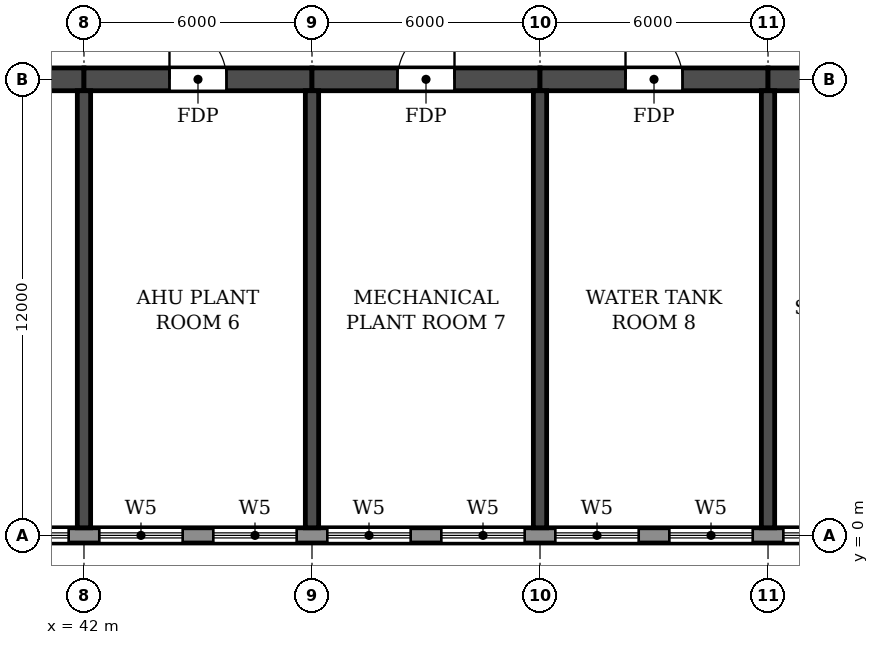
"""IFC4 building model, lengths in metres.
Left out: names, types, materials, properties, quantities, classifications, styles, units other than length and angle.
Written with IfcOpenShell. Run it as: python <this file> out.ifc"""

import sys

from ifc_helpers import new_model, si_unit, direction, frame, frame_2d, origin, place, context, subcontext, project, spatial, rectangle, extrude, element, fill, save


model = new_model("IFC4")
c1 = context("Model", 3, precision=1e-05, world=origin(), true_north=direction((0.0, 1.0)))
c2 = subcontext(c1, "Body", "Model", "MODEL_VIEW")
j1 = project(units=[si_unit("LENGTHUNIT", "METRE"), si_unit("PLANEANGLEUNIT", "RADIAN")], contexts=[c1])
p1 = place(None, origin())
s1 = spatial("IfcSite", under=j1, at=p1, CompositionType="ELEMENT")
p2 = place(p1, origin())
s2 = spatial("IfcBuilding", under=s1, at=p2, CompositionType="ELEMENT")
p3 = place(p2, frame((0.0, 0.0, 115.8)))
s3 = spatial("IfcBuildingStorey", under=s2, at=p3, CompositionType="ELEMENT", Elevation=115.8)
for number, where, z_axis, x_axis in (
    (1, (42.0, 0.2, 0.0), (0.0, 0.0, 1.0), (0.0, 1.0, 0.0)),
    (2, (48.0, 0.2, 0.0), (0.0, 0.0, 1.0), (0.0, 1.0, 0.0)),
    (3, (54.0, 0.2, 0.0), (0.0, 0.0, 1.0), (0.0, 1.0, 0.0)),
    (4, (60.0, 0.2, 0.0), (0.0, 0.0, 1.0), (0.0, 1.0, 0.0)),
):
    element("IfcWall", number, at=place(p3, frame(where, z_axis=z_axis, x_axis=x_axis)), inside=s3, PredefinedType="SHEAR", context=c2, shape_type="SweptSolid", body=[
        extrude(rectangle(XDim=11.5, YDim=0.35, at=frame_2d((5.75, 0.0))), origin(), (0.0, 0.0, 1.0), 6.37),
    ])
p4 = place(p3, frame((36.0, 12.0, 0.0), z_axis=(0.0, 0.0, 1.0), x_axis=(1.0, 0.0, 0.0)))
e5 = element("IfcWall", 5, at=p4, inside=s3, PredefinedType="SHEAR", context=c2, shape_type="SweptSolid", body=[
    extrude(rectangle(XDim=6.0, YDim=0.6, at=frame_2d((3.0, 0.0))), origin(), (0.0, 0.0, 1.0), 6.37),
])
p5 = place(p4, frame((2.25, 0.0, 0.0)))
e6 = element("IfcOpeningElement", 6, at=p5, cuts=e5, PredefinedType="OPENING", context=c2, shape_type="SweptSolid", body=[
    extrude(rectangle(XDim=1.5, YDim=2.1, at=frame_2d((0.75, 1.05))), frame((0.0, 0.31, 0.0), z_axis=(0.0, -1.0, 0.0), x_axis=(1.0, 0.0, 0.0)), (0.0, 0.0, 1.0), 0.62),
])
p6 = place(p3, frame((42.0, 12.0, 0.0), z_axis=(0.0, 0.0, 1.0), x_axis=(1.0, 0.0, 0.0)))
e7 = element("IfcWall", 7, at=p6, inside=s3, PredefinedType="SHEAR", context=c2, shape_type="SweptSolid", body=[
    extrude(rectangle(XDim=6.0, YDim=0.6, at=frame_2d((3.0, 0.0))), origin(), (0.0, 0.0, 1.0), 6.37),
])
p7 = place(p6, frame((2.25, 0.0, 0.0)))
e8 = element("IfcOpeningElement", 8, at=p7, cuts=e7, PredefinedType="OPENING", context=c2, shape_type="SweptSolid", body=[
    extrude(rectangle(XDim=1.5, YDim=2.1, at=frame_2d((0.75, 1.05))), frame((0.0, 0.31, 0.0), z_axis=(0.0, -1.0, 0.0), x_axis=(1.0, 0.0, 0.0)), (0.0, 0.0, 1.0), 0.62),
])
p8 = place(p3, frame((48.0, 12.0, 0.0), z_axis=(0.0, 0.0, 1.0), x_axis=(1.0, 0.0, 0.0)))
e9 = element("IfcWall", 9, at=p8, inside=s3, PredefinedType="SHEAR", context=c2, shape_type="SweptSolid", body=[
    extrude(rectangle(XDim=6.0, YDim=0.6, at=frame_2d((3.0, 0.0))), origin(), (0.0, 0.0, 1.0), 6.37),
])
p9 = place(p8, frame((2.25, 0.0, 0.0)))
e10 = element("IfcOpeningElement", 10, at=p9, cuts=e9, PredefinedType="OPENING", context=c2, shape_type="SweptSolid", body=[
    extrude(rectangle(XDim=1.5, YDim=2.1, at=frame_2d((0.75, 1.05))), frame((0.0, 0.31, 0.0), z_axis=(0.0, -1.0, 0.0), x_axis=(1.0, 0.0, 0.0)), (0.0, 0.0, 1.0), 0.62),
])
p10 = place(p3, frame((54.0, 12.0, 0.0), z_axis=(0.0, 0.0, 1.0), x_axis=(1.0, 0.0, 0.0)))
e11 = element("IfcWall", 11, at=p10, inside=s3, PredefinedType="SHEAR", context=c2, shape_type="SweptSolid", body=[
    extrude(rectangle(XDim=6.0, YDim=0.6, at=frame_2d((3.0, 0.0))), origin(), (0.0, 0.0, 1.0), 6.37),
])
p11 = place(p10, frame((2.25, 0.0, 0.0)))
e12 = element("IfcOpeningElement", 12, at=p11, cuts=e11, PredefinedType="OPENING", context=c2, shape_type="SweptSolid", body=[
    extrude(rectangle(XDim=1.5, YDim=2.1, at=frame_2d((0.75, 1.05))), frame((0.0, 0.31, 0.0), z_axis=(0.0, -1.0, 0.0), x_axis=(1.0, 0.0, 0.0)), (0.0, 0.0, 1.0), 0.62),
])
p12 = place(p3, frame((60.0, 12.0, 0.0), z_axis=(0.0, 0.0, 1.0), x_axis=(1.0, 0.0, 0.0)))
e13 = element("IfcWall", 13, at=p12, inside=s3, PredefinedType="SHEAR", context=c2, shape_type="SweptSolid", body=[
    extrude(rectangle(XDim=6.0, YDim=0.6, at=frame_2d((3.0, 0.0))), origin(), (0.0, 0.0, 1.0), 6.37),
])
p13 = place(p12, frame((2.25, 0.0, 0.0)))
e14 = element("IfcOpeningElement", 14, at=p13, cuts=e13, PredefinedType="OPENING", context=c2, shape_type="SweptSolid", body=[
    extrude(rectangle(XDim=1.5, YDim=2.1, at=frame_2d((0.75, 1.05))), frame((0.0, 0.31, 0.0), z_axis=(0.0, -1.0, 0.0), x_axis=(1.0, 0.0, 0.0)), (0.0, 0.0, 1.0), 0.62),
])
p14 = place(p3, frame((16.683, 0.0, 0.0), z_axis=(0.0, 0.0, 1.0), x_axis=(1.0, 0.0, 0.0)))
e15 = element("IfcWall", 15, at=p14, inside=s3, PredefinedType="STANDARD", context=c2, shape_type="SweptSolid", body=[
    extrude(rectangle(XDim=68.634, YDim=0.4, at=frame_2d((34.317, 0.0))), origin(), (0.0, 0.0, 1.0), 6.37),
])
p15 = place(p14, frame((1.717, 0.0, 0.6)))
e16 = element("IfcOpeningElement", 16, at=p15, cuts=e15, PredefinedType="OPENING", context=c2, shape_type="SweptSolid", body=[
    extrude(rectangle(XDim=2.2, YDim=2.4, at=frame_2d((1.1, 1.2))), frame((0.0, 0.21, 0.0), z_axis=(0.0, -1.0, 0.0), x_axis=(1.0, 0.0, 0.0)), (0.0, 0.0, 1.0), 0.42),
])
p16 = place(p14, frame((4.717, 0.0, 0.6)))
e17 = element("IfcOpeningElement", 17, at=p16, cuts=e15, PredefinedType="OPENING", context=c2, shape_type="SweptSolid", body=[
    extrude(rectangle(XDim=2.2, YDim=2.4, at=frame_2d((1.1, 1.2))), frame((0.0, 0.21, 0.0), z_axis=(0.0, -1.0, 0.0), x_axis=(1.0, 0.0, 0.0)), (0.0, 0.0, 1.0), 0.42),
])
p17 = place(p14, frame((7.717, 0.0, 0.6)))
e18 = element("IfcOpeningElement", 18, at=p17, cuts=e15, PredefinedType="OPENING", context=c2, shape_type="SweptSolid", body=[
    extrude(rectangle(XDim=2.2, YDim=2.4, at=frame_2d((1.1, 1.2))), frame((0.0, 0.21, 0.0), z_axis=(0.0, -1.0, 0.0), x_axis=(1.0, 0.0, 0.0)), (0.0, 0.0, 1.0), 0.42),
])
p18 = place(p14, frame((10.717, 0.0, 0.6)))
e19 = element("IfcOpeningElement", 19, at=p18, cuts=e15, PredefinedType="OPENING", context=c2, shape_type="SweptSolid", body=[
    extrude(rectangle(XDim=2.2, YDim=2.4, at=frame_2d((1.1, 1.2))), frame((0.0, 0.21, 0.0), z_axis=(0.0, -1.0, 0.0), x_axis=(1.0, 0.0, 0.0)), (0.0, 0.0, 1.0), 0.42),
])
p19 = place(p14, frame((13.717, 0.0, 0.6)))
e20 = element("IfcOpeningElement", 20, at=p19, cuts=e15, PredefinedType="OPENING", context=c2, shape_type="SweptSolid", body=[
    extrude(rectangle(XDim=2.2, YDim=2.4, at=frame_2d((1.1, 1.2))), frame((0.0, 0.21, 0.0), z_axis=(0.0, -1.0, 0.0), x_axis=(1.0, 0.0, 0.0)), (0.0, 0.0, 1.0), 0.42),
])
p20 = place(p14, frame((16.717, 0.0, 0.6)))
e21 = element("IfcOpeningElement", 21, at=p20, cuts=e15, PredefinedType="OPENING", context=c2, shape_type="SweptSolid", body=[
    extrude(rectangle(XDim=2.2, YDim=2.4, at=frame_2d((1.1, 1.2))), frame((0.0, 0.21, 0.0), z_axis=(0.0, -1.0, 0.0), x_axis=(1.0, 0.0, 0.0)), (0.0, 0.0, 1.0), 0.42),
])
p21 = place(p14, frame((19.717, 0.0, 0.6)))
e22 = element("IfcOpeningElement", 22, at=p21, cuts=e15, PredefinedType="OPENING", context=c2, shape_type="SweptSolid", body=[
    extrude(rectangle(XDim=2.2, YDim=2.4, at=frame_2d((1.1, 1.2))), frame((0.0, 0.21, 0.0), z_axis=(0.0, -1.0, 0.0), x_axis=(1.0, 0.0, 0.0)), (0.0, 0.0, 1.0), 0.42),
])
p22 = place(p14, frame((22.717, 0.0, 0.6)))
e23 = element("IfcOpeningElement", 23, at=p22, cuts=e15, PredefinedType="OPENING", context=c2, shape_type="SweptSolid", body=[
    extrude(rectangle(XDim=2.2, YDim=2.4, at=frame_2d((1.1, 1.2))), frame((0.0, 0.21, 0.0), z_axis=(0.0, -1.0, 0.0), x_axis=(1.0, 0.0, 0.0)), (0.0, 0.0, 1.0), 0.42),
])
p23 = place(p14, frame((25.717, 0.0, 0.6)))
e24 = element("IfcOpeningElement", 24, at=p23, cuts=e15, PredefinedType="OPENING", context=c2, shape_type="SweptSolid", body=[
    extrude(rectangle(XDim=2.2, YDim=2.4, at=frame_2d((1.1, 1.2))), frame((0.0, 0.21, 0.0), z_axis=(0.0, -1.0, 0.0), x_axis=(1.0, 0.0, 0.0)), (0.0, 0.0, 1.0), 0.42),
])
p24 = place(p14, frame((28.717, 0.0, 0.6)))
e25 = element("IfcOpeningElement", 25, at=p24, cuts=e15, PredefinedType="OPENING", context=c2, shape_type="SweptSolid", body=[
    extrude(rectangle(XDim=2.2, YDim=2.4, at=frame_2d((1.1, 1.2))), frame((0.0, 0.21, 0.0), z_axis=(0.0, -1.0, 0.0), x_axis=(1.0, 0.0, 0.0)), (0.0, 0.0, 1.0), 0.42),
])
p25 = place(p14, frame((31.717, 0.0, 0.6)))
e26 = element("IfcOpeningElement", 26, at=p25, cuts=e15, PredefinedType="OPENING", context=c2, shape_type="SweptSolid", body=[
    extrude(rectangle(XDim=2.2, YDim=2.4, at=frame_2d((1.1, 1.2))), frame((0.0, 0.21, 0.0), z_axis=(0.0, -1.0, 0.0), x_axis=(1.0, 0.0, 0.0)), (0.0, 0.0, 1.0), 0.42),
])
p26 = place(p14, frame((34.717, 0.0, 0.6)))
e27 = element("IfcOpeningElement", 27, at=p26, cuts=e15, PredefinedType="OPENING", context=c2, shape_type="SweptSolid", body=[
    extrude(rectangle(XDim=2.2, YDim=2.4, at=frame_2d((1.1, 1.2))), frame((0.0, 0.21, 0.0), z_axis=(0.0, -1.0, 0.0), x_axis=(1.0, 0.0, 0.0)), (0.0, 0.0, 1.0), 0.42),
])
p27 = place(p14, frame((37.717, 0.0, 0.6)))
e28 = element("IfcOpeningElement", 28, at=p27, cuts=e15, PredefinedType="OPENING", context=c2, shape_type="SweptSolid", body=[
    extrude(rectangle(XDim=2.2, YDim=2.4, at=frame_2d((1.1, 1.2))), frame((0.0, 0.21, 0.0), z_axis=(0.0, -1.0, 0.0), x_axis=(1.0, 0.0, 0.0)), (0.0, 0.0, 1.0), 0.42),
])
p28 = place(p14, frame((40.717, 0.0, 0.6)))
e29 = element("IfcOpeningElement", 29, at=p28, cuts=e15, PredefinedType="OPENING", context=c2, shape_type="SweptSolid", body=[
    extrude(rectangle(XDim=2.2, YDim=2.4, at=frame_2d((1.1, 1.2))), frame((0.0, 0.21, 0.0), z_axis=(0.0, -1.0, 0.0), x_axis=(1.0, 0.0, 0.0)), (0.0, 0.0, 1.0), 0.42),
])
p29 = place(p14, frame((43.717, 0.0, 0.6)))
e30 = element("IfcOpeningElement", 30, at=p29, cuts=e15, PredefinedType="OPENING", context=c2, shape_type="SweptSolid", body=[
    extrude(rectangle(XDim=2.2, YDim=2.4, at=frame_2d((1.1, 1.2))), frame((0.0, 0.21, 0.0), z_axis=(0.0, -1.0, 0.0), x_axis=(1.0, 0.0, 0.0)), (0.0, 0.0, 1.0), 0.42),
])
p30 = place(p14, frame((46.717, 0.0, 0.6)))
e31 = element("IfcOpeningElement", 31, at=p30, cuts=e15, PredefinedType="OPENING", context=c2, shape_type="SweptSolid", body=[
    extrude(rectangle(XDim=2.2, YDim=2.4, at=frame_2d((1.1, 1.2))), frame((0.0, 0.21, 0.0), z_axis=(0.0, -1.0, 0.0), x_axis=(1.0, 0.0, 0.0)), (0.0, 0.0, 1.0), 0.42),
])
p31 = place(p14, frame((49.717, 0.0, 0.6)))
e32 = element("IfcOpeningElement", 32, at=p31, cuts=e15, PredefinedType="OPENING", context=c2, shape_type="SweptSolid", body=[
    extrude(rectangle(XDim=2.2, YDim=2.4, at=frame_2d((1.1, 1.2))), frame((0.0, 0.21, 0.0), z_axis=(0.0, -1.0, 0.0), x_axis=(1.0, 0.0, 0.0)), (0.0, 0.0, 1.0), 0.42),
])
p32 = place(p14, frame((52.717, 0.0, 0.6)))
e33 = element("IfcOpeningElement", 33, at=p32, cuts=e15, PredefinedType="OPENING", context=c2, shape_type="SweptSolid", body=[
    extrude(rectangle(XDim=2.2, YDim=2.4, at=frame_2d((1.1, 1.2))), frame((0.0, 0.21, 0.0), z_axis=(0.0, -1.0, 0.0), x_axis=(1.0, 0.0, 0.0)), (0.0, 0.0, 1.0), 0.42),
])
p33 = place(p14, frame((55.717, 0.0, 0.6)))
e34 = element("IfcOpeningElement", 34, at=p33, cuts=e15, PredefinedType="OPENING", context=c2, shape_type="SweptSolid", body=[
    extrude(rectangle(XDim=2.2, YDim=2.4, at=frame_2d((1.1, 1.2))), frame((0.0, 0.21, 0.0), z_axis=(0.0, -1.0, 0.0), x_axis=(1.0, 0.0, 0.0)), (0.0, 0.0, 1.0), 0.42),
])
p34 = place(p14, frame((58.717, 0.0, 0.6)))
e35 = element("IfcOpeningElement", 35, at=p34, cuts=e15, PredefinedType="OPENING", context=c2, shape_type="SweptSolid", body=[
    extrude(rectangle(XDim=2.2, YDim=2.4, at=frame_2d((1.1, 1.2))), frame((0.0, 0.21, 0.0), z_axis=(0.0, -1.0, 0.0), x_axis=(1.0, 0.0, 0.0)), (0.0, 0.0, 1.0), 0.42),
])
p35 = place(p14, frame((61.717, 0.0, 0.6)))
e36 = element("IfcOpeningElement", 36, at=p35, cuts=e15, PredefinedType="OPENING", context=c2, shape_type="SweptSolid", body=[
    extrude(rectangle(XDim=2.2, YDim=2.4, at=frame_2d((1.1, 1.2))), frame((0.0, 0.21, 0.0), z_axis=(0.0, -1.0, 0.0), x_axis=(1.0, 0.0, 0.0)), (0.0, 0.0, 1.0), 0.42),
])
p36 = place(p14, frame((64.717, 0.0, 0.6)))
e37 = element("IfcOpeningElement", 37, at=p36, cuts=e15, PredefinedType="OPENING", context=c2, shape_type="SweptSolid", body=[
    extrude(rectangle(XDim=2.2, YDim=2.4, at=frame_2d((1.1, 1.2))), frame((0.0, 0.21, 0.0), z_axis=(0.0, -1.0, 0.0), x_axis=(1.0, 0.0, 0.0)), (0.0, 0.0, 1.0), 0.42),
])
p37 = place(p22, origin())
e38 = element("IfcWindow", 38, at=p37, inside=s3, PartitioningType="TRIPLE_PANEL_HORIZONTAL", PredefinedType="WINDOW", context=c2, shape_type="SweptSolid", body=[
    extrude(rectangle(XDim=2.2, YDim=2.4, at=frame_2d((1.1, 1.2))), frame((0.0, 0.03, 0.0), z_axis=(0.0, -1.0, 0.0), x_axis=(1.0, 0.0, 0.0)), (0.0, 0.0, 1.0), 0.06),
])
fill(e23, e38)
p38 = place(p23, origin())
e39 = element("IfcWindow", 39, at=p38, inside=s3, PartitioningType="TRIPLE_PANEL_HORIZONTAL", PredefinedType="WINDOW", context=c2, shape_type="SweptSolid", body=[
    extrude(rectangle(XDim=2.2, YDim=2.4, at=frame_2d((1.1, 1.2))), frame((0.0, 0.03, 0.0), z_axis=(0.0, -1.0, 0.0), x_axis=(1.0, 0.0, 0.0)), (0.0, 0.0, 1.0), 0.06),
])
fill(e24, e39)
p39 = place(p24, origin())
e40 = element("IfcWindow", 40, at=p39, inside=s3, PartitioningType="TRIPLE_PANEL_HORIZONTAL", PredefinedType="WINDOW", context=c2, shape_type="SweptSolid", body=[
    extrude(rectangle(XDim=2.2, YDim=2.4, at=frame_2d((1.1, 1.2))), frame((0.0, 0.03, 0.0), z_axis=(0.0, -1.0, 0.0), x_axis=(1.0, 0.0, 0.0)), (0.0, 0.0, 1.0), 0.06),
])
fill(e25, e40)
p40 = place(p25, origin())
e41 = element("IfcWindow", 41, at=p40, inside=s3, PartitioningType="TRIPLE_PANEL_HORIZONTAL", PredefinedType="WINDOW", context=c2, shape_type="SweptSolid", body=[
    extrude(rectangle(XDim=2.2, YDim=2.4, at=frame_2d((1.1, 1.2))), frame((0.0, 0.03, 0.0), z_axis=(0.0, -1.0, 0.0), x_axis=(1.0, 0.0, 0.0)), (0.0, 0.0, 1.0), 0.06),
])
fill(e26, e41)
p41 = place(p26, origin())
e42 = element("IfcWindow", 42, at=p41, inside=s3, PartitioningType="TRIPLE_PANEL_HORIZONTAL", PredefinedType="WINDOW", context=c2, shape_type="SweptSolid", body=[
    extrude(rectangle(XDim=2.2, YDim=2.4, at=frame_2d((1.1, 1.2))), frame((0.0, 0.03, 0.0), z_axis=(0.0, -1.0, 0.0), x_axis=(1.0, 0.0, 0.0)), (0.0, 0.0, 1.0), 0.06),
])
fill(e27, e42)
p42 = place(p27, origin())
e43 = element("IfcWindow", 43, at=p42, inside=s3, PartitioningType="TRIPLE_PANEL_HORIZONTAL", PredefinedType="WINDOW", context=c2, shape_type="SweptSolid", body=[
    extrude(rectangle(XDim=2.2, YDim=2.4, at=frame_2d((1.1, 1.2))), frame((0.0, 0.03, 0.0), z_axis=(0.0, -1.0, 0.0), x_axis=(1.0, 0.0, 0.0)), (0.0, 0.0, 1.0), 0.06),
])
fill(e28, e43)
p43 = place(p28, origin())
e44 = element("IfcWindow", 44, at=p43, inside=s3, PartitioningType="TRIPLE_PANEL_HORIZONTAL", PredefinedType="WINDOW", context=c2, shape_type="SweptSolid", body=[
    extrude(rectangle(XDim=2.2, YDim=2.4, at=frame_2d((1.1, 1.2))), frame((0.0, 0.03, 0.0), z_axis=(0.0, -1.0, 0.0), x_axis=(1.0, 0.0, 0.0)), (0.0, 0.0, 1.0), 0.06),
])
fill(e29, e44)
p44 = place(p29, origin())
e45 = element("IfcWindow", 45, at=p44, inside=s3, PartitioningType="TRIPLE_PANEL_HORIZONTAL", PredefinedType="WINDOW", context=c2, shape_type="SweptSolid", body=[
    extrude(rectangle(XDim=2.2, YDim=2.4, at=frame_2d((1.1, 1.2))), frame((0.0, 0.03, 0.0), z_axis=(0.0, -1.0, 0.0), x_axis=(1.0, 0.0, 0.0)), (0.0, 0.0, 1.0), 0.06),
])
fill(e30, e45)
p45 = place(p7, origin())
e46 = element("IfcDoor", 46, at=p45, inside=s3, OperationType="DOUBLE_DOOR_SINGLE_SWING", PredefinedType="DOOR", context=c2, shape_type="SweptSolid", body=[
    extrude(rectangle(XDim=1.5, YDim=2.1, at=frame_2d((0.75, 1.05))), frame((0.0, 0.025, 0.0), z_axis=(0.0, -1.0, 0.0), x_axis=(1.0, 0.0, 0.0)), (0.0, 0.0, 1.0), 0.05),
])
fill(e8, e46)
p46 = place(p9, origin())
e47 = element("IfcDoor", 47, at=p46, inside=s3, OperationType="DOUBLE_DOOR_SINGLE_SWING", PredefinedType="DOOR", context=c2, shape_type="SweptSolid", body=[
    extrude(rectangle(XDim=1.5, YDim=2.1, at=frame_2d((0.75, 1.05))), frame((0.0, 0.025, 0.0), z_axis=(0.0, -1.0, 0.0), x_axis=(1.0, 0.0, 0.0)), (0.0, 0.0, 1.0), 0.05),
])
fill(e10, e47)
p47 = place(p11, origin())
e48 = element("IfcDoor", 48, at=p47, inside=s3, OperationType="DOUBLE_DOOR_SINGLE_SWING", PredefinedType="DOOR", context=c2, shape_type="SweptSolid", body=[
    extrude(rectangle(XDim=1.5, YDim=2.1, at=frame_2d((0.75, 1.05))), frame((0.0, 0.025, 0.0), z_axis=(0.0, -1.0, 0.0), x_axis=(1.0, 0.0, 0.0)), (0.0, 0.0, 1.0), 0.05),
])
fill(e12, e48)
save(model, sys.argv[1])
